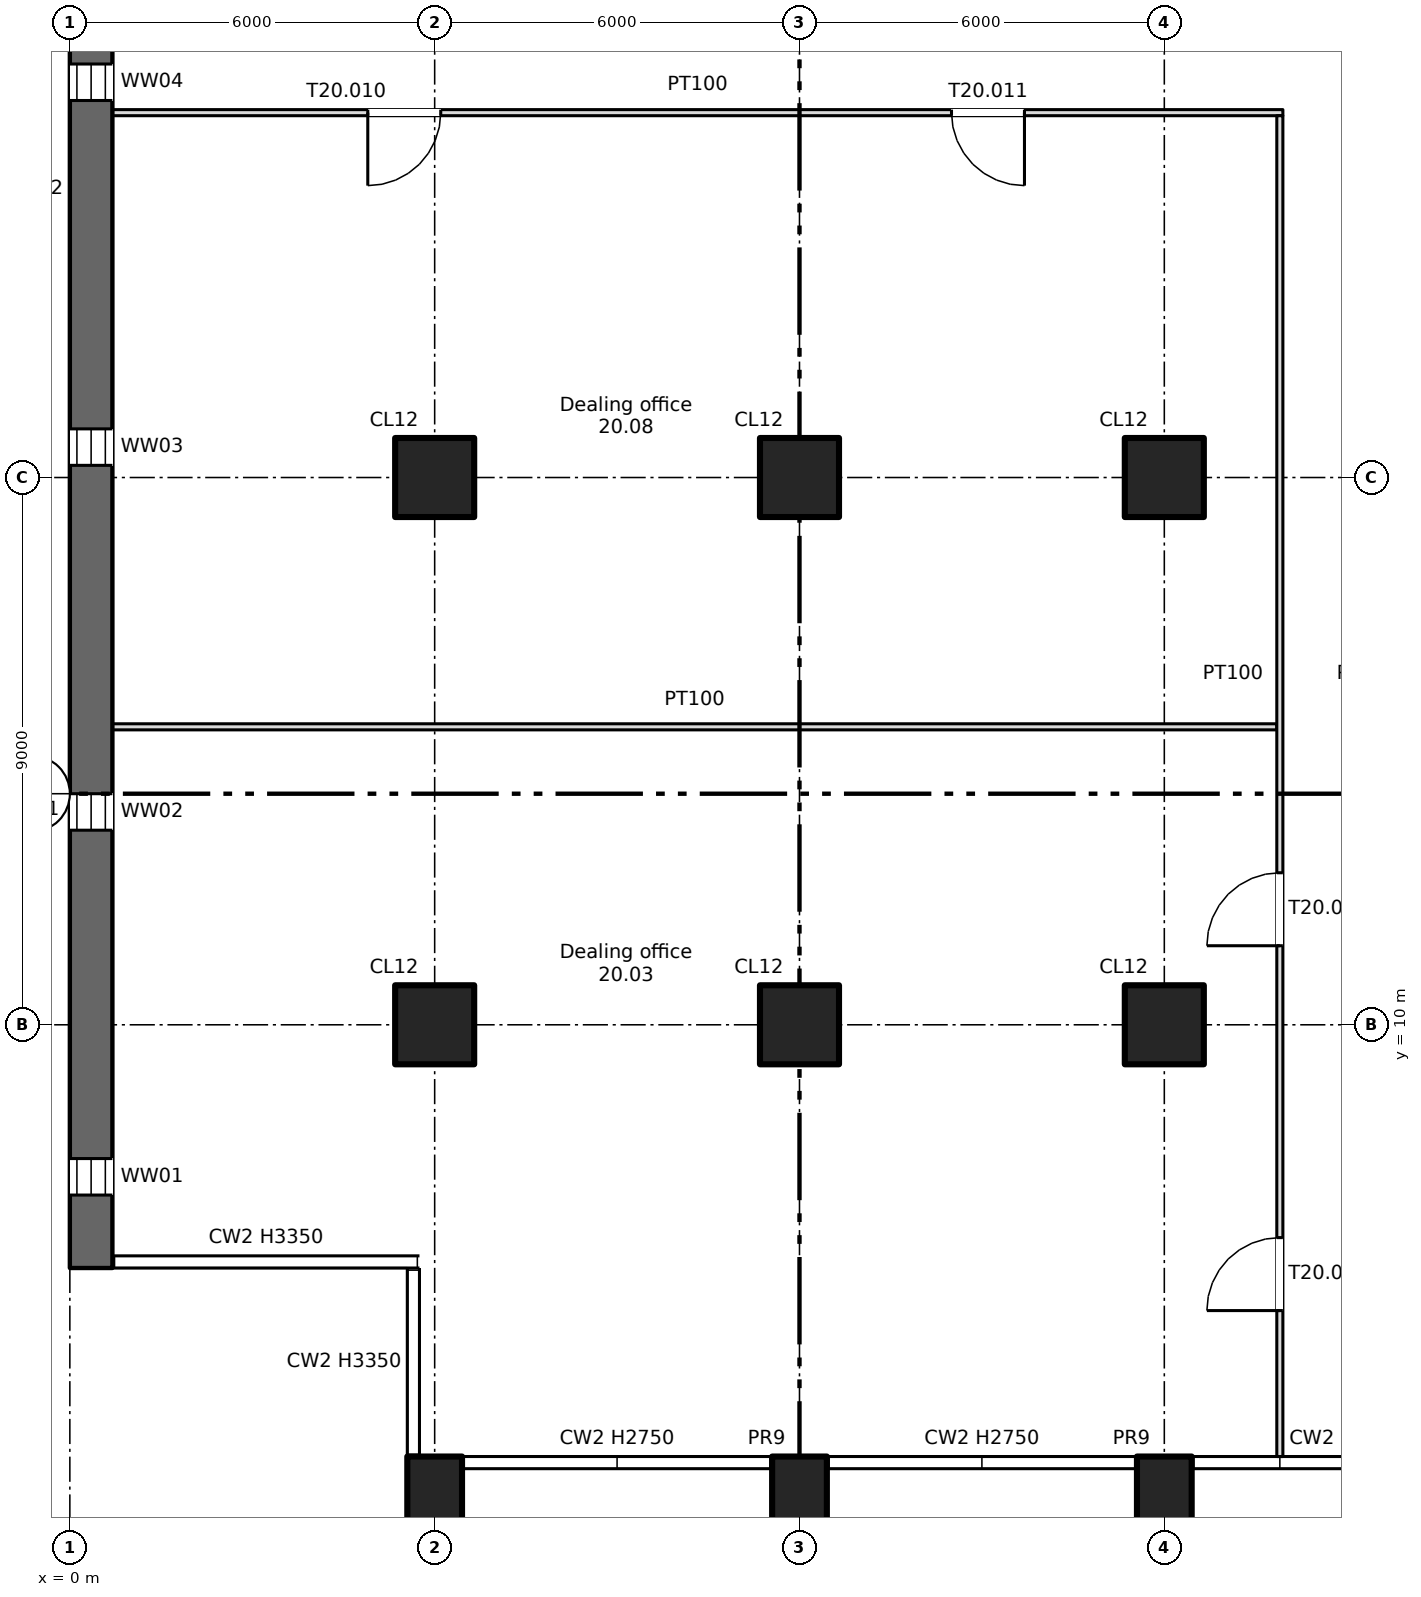
"""IFC4 building model, lengths in metres.
Left out: names, types, materials, properties, quantities, classifications, styles, units other than length and angle.
Written with IfcOpenShell. Run it as: python <this file> out.ifc"""

import sys

from ifc_helpers import new_model, si_unit, direction, frame, frame_2d, origin, origin_2d, place, context, subcontext, project, spatial, rectangle, extrude, element, fill, save


model = new_model("IFC4")
c1 = context("Model", 3, precision=1e-05, world=origin(), true_north=direction((0.0, 1.0)))
c2 = subcontext(c1, "Body", "Model", "MODEL_VIEW")
j1 = project(units=[si_unit("LENGTHUNIT", "METRE"), si_unit("PLANEANGLEUNIT", "RADIAN")], contexts=[c1])
p1 = place(None, origin())
s1 = spatial("IfcSite", under=j1, at=p1, CompositionType="ELEMENT")
p2 = place(p1, origin())
s2 = spatial("IfcBuilding", under=s1, at=p2, CompositionType="ELEMENT")
p3 = place(p2, frame((0.0, 0.0, 128.75)))
s3 = spatial("IfcBuildingStorey", under=s2, at=p3, CompositionType="ELEMENT", Elevation=128.75)
for number, where, z_axis, x_axis in (
    (1, (6.0, 2.2, -0.4), (0.0, 0.0, 1.0), (1.0, 0.0, 0.0)),
    (2, (12.0, 2.2, -0.4), (0.0, 0.0, 1.0), (1.0, 0.0, 0.0)),
    (3, (18.0, 2.2, -0.4), (0.0, 0.0, 1.0), (1.0, 0.0, 0.0)),
):
    element("IfcColumn", number, at=place(p3, frame(where, z_axis=z_axis, x_axis=x_axis)), inside=s3, PredefinedType="COLUMN", context=c2, shape_type="SweptSolid", body=[
        extrude(rectangle(XDim=0.9, YDim=1.4, at=origin_2d()), origin(), (0.0, 0.0, 1.0), 3.75),
    ])
for number, where, z_axis, x_axis in (
    (4, (6.0, 10.0, 0.0), (0.0, 0.0, 1.0), (1.0, 0.0, 0.0)),
    (5, (6.0, 19.0, 0.0), (0.0, 0.0, 1.0), (1.0, 0.0, 0.0)),
    (6, (12.0, 10.0, 0.0), (0.0, 0.0, 1.0), (1.0, 0.0, 0.0)),
    (7, (12.0, 19.0, 0.0), (0.0, 0.0, 1.0), (1.0, 0.0, 0.0)),
    (8, (18.0, 10.0, 0.0), (0.0, 0.0, 1.0), (1.0, 0.0, 0.0)),
    (9, (18.0, 19.0, 0.0), (0.0, 0.0, 1.0), (1.0, 0.0, 0.0)),
):
    element("IfcColumn", number, at=place(p3, frame(where, z_axis=z_axis, x_axis=x_axis)), inside=s3, PredefinedType="COLUMN", context=c2, shape_type="SweptSolid", body=[
        extrude(rectangle(XDim=1.3, YDim=1.3, at=origin_2d()), origin(), (0.0, 0.0, 1.0), 3.35),
    ])
p4 = place(p3, frame((0.35, 6.0, 0.0), z_axis=(0.0, 0.0, 1.0), x_axis=(0.0, 1.0, 0.0)))
e10 = element("IfcWall", 10, at=p4, inside=s3, PredefinedType="SHEAR", context=c2, shape_type="SweptSolid", body=[
    extrude(rectangle(XDim=35.5, YDim=0.7, at=frame_2d((17.75, 0.0))), origin(), (0.0, 0.0, 1.0), 3.35),
])
p5 = place(p4, frame((1.2, 0.0, 0.6)))
e11 = element("IfcOpeningElement", 11, at=p5, cuts=e10, PredefinedType="OPENING", context=c2, shape_type="SweptSolid", body=[
    extrude(rectangle(XDim=0.6, YDim=2.4, at=frame_2d((0.3, 1.2))), frame((0.0, 0.36, 0.0), z_axis=(0.0, -1.0, 0.0), x_axis=(1.0, 0.0, 0.0)), (0.0, 0.0, 1.0), 0.72),
])
p6 = place(p4, frame((7.2, 0.0, 0.6)))
e12 = element("IfcOpeningElement", 12, at=p6, cuts=e10, PredefinedType="OPENING", context=c2, shape_type="SweptSolid", body=[
    extrude(rectangle(XDim=0.6, YDim=2.4, at=frame_2d((0.3, 1.2))), frame((0.0, 0.36, 0.0), z_axis=(0.0, -1.0, 0.0), x_axis=(1.0, 0.0, 0.0)), (0.0, 0.0, 1.0), 0.72),
])
p7 = place(p4, frame((13.2, 0.0, 0.6)))
e13 = element("IfcOpeningElement", 13, at=p7, cuts=e10, PredefinedType="OPENING", context=c2, shape_type="SweptSolid", body=[
    extrude(rectangle(XDim=0.6, YDim=2.4, at=frame_2d((0.3, 1.2))), frame((0.0, 0.36, 0.0), z_axis=(0.0, -1.0, 0.0), x_axis=(1.0, 0.0, 0.0)), (0.0, 0.0, 1.0), 0.72),
])
p8 = place(p4, frame((19.2, 0.0, 0.6)))
e14 = element("IfcOpeningElement", 14, at=p8, cuts=e10, PredefinedType="OPENING", context=c2, shape_type="SweptSolid", body=[
    extrude(rectangle(XDim=0.6, YDim=2.4, at=frame_2d((0.3, 1.2))), frame((0.0, 0.36, 0.0), z_axis=(0.0, -1.0, 0.0), x_axis=(1.0, 0.0, 0.0)), (0.0, 0.0, 1.0), 0.72),
])
p9 = place(p4, frame((25.2, 0.0, 0.6)))
e15 = element("IfcOpeningElement", 15, at=p9, cuts=e10, PredefinedType="OPENING", context=c2, shape_type="SweptSolid", body=[
    extrude(rectangle(XDim=0.6, YDim=2.4, at=frame_2d((0.3, 1.2))), frame((0.0, 0.36, 0.0), z_axis=(0.0, -1.0, 0.0), x_axis=(1.0, 0.0, 0.0)), (0.0, 0.0, 1.0), 0.72),
])
p10 = place(p4, frame((31.2, 0.0, 0.6)))
e16 = element("IfcOpeningElement", 16, at=p10, cuts=e10, PredefinedType="OPENING", context=c2, shape_type="SweptSolid", body=[
    extrude(rectangle(XDim=0.6, YDim=2.4, at=frame_2d((0.3, 1.2))), frame((0.0, 0.36, 0.0), z_axis=(0.0, -1.0, 0.0), x_axis=(1.0, 0.0, 0.0)), (0.0, 0.0, 1.0), 0.72),
])
p11 = place(p3, frame((0.7, 14.9, 0.0), z_axis=(0.0, 0.0, 1.0), x_axis=(1.0, 0.0, 0.0)))
e17 = element("IfcWall", 17, at=p11, inside=s3, PredefinedType="PARTITIONING", context=c2, shape_type="SweptSolid", body=[
    extrude(rectangle(XDim=19.15, YDim=0.1, at=frame_2d((9.575, 0.0))), origin(), (0.0, 0.0, 1.0), 3.35),
])
p12 = place(p3, frame((0.7, 25.0, 0.0), z_axis=(0.0, 0.0, 1.0), x_axis=(1.0, 0.0, 0.0)))
e18 = element("IfcWall", 18, at=p12, inside=s3, PredefinedType="PARTITIONING", context=c2, shape_type="SweptSolid", body=[
    extrude(rectangle(XDim=19.25, YDim=0.1, at=frame_2d((9.625, 0.0))), origin(), (0.0, 0.0, 1.0), 3.35),
])
p13 = place(p12, frame((4.2, 0.0, 0.0)))
e19 = element("IfcOpeningElement", 19, at=p13, cuts=e18, PredefinedType="OPENING", context=c2, shape_type="SweptSolid", body=[
    extrude(rectangle(XDim=1.2, YDim=2.1, at=frame_2d((0.6, 1.05))), frame((0.0, 0.06, 0.0), z_axis=(0.0, -1.0, 0.0), x_axis=(1.0, 0.0, 0.0)), (0.0, 0.0, 1.0), 0.12),
])
p14 = place(p12, frame((13.8, 0.0, 0.0)))
e20 = element("IfcOpeningElement", 20, at=p14, cuts=e18, PredefinedType="OPENING", context=c2, shape_type="SweptSolid", body=[
    extrude(rectangle(XDim=1.2, YDim=2.1, at=frame_2d((0.6, 1.05))), frame((0.0, 0.06, 0.0), z_axis=(0.0, -1.0, 0.0), x_axis=(1.0, 0.0, 0.0)), (0.0, 0.0, 1.0), 0.12),
])
p15 = place(p3, frame((19.9, 2.9, 0.0), z_axis=(0.0, 0.0, 1.0), x_axis=(0.0, 1.0, 0.0)))
e21 = element("IfcWall", 21, at=p15, inside=s3, PredefinedType="PARTITIONING", context=c2, shape_type="SweptSolid", body=[
    extrude(rectangle(XDim=22.05, YDim=0.1, at=frame_2d((11.025, 0.0))), origin(), (0.0, 0.0, 1.0), 3.35),
])
p16 = place(p15, frame((2.4, 0.0, 0.0)))
e22 = element("IfcOpeningElement", 22, at=p16, cuts=e21, PredefinedType="OPENING", context=c2, shape_type="SweptSolid", body=[
    extrude(rectangle(XDim=1.2, YDim=2.1, at=frame_2d((0.6, 1.05))), frame((0.0, 0.06, 0.0), z_axis=(0.0, -1.0, 0.0), x_axis=(1.0, 0.0, 0.0)), (0.0, 0.0, 1.0), 0.12),
])
p17 = place(p15, frame((8.4, 0.0, 0.0)))
e23 = element("IfcOpeningElement", 23, at=p17, cuts=e21, PredefinedType="OPENING", context=c2, shape_type="SweptSolid", body=[
    extrude(rectangle(XDim=1.2, YDim=2.1, at=frame_2d((0.6, 1.05))), frame((0.0, 0.06, 0.0), z_axis=(0.0, -1.0, 0.0), x_axis=(1.0, 0.0, 0.0)), (0.0, 0.0, 1.0), 0.12),
])
p18 = place(p5, origin())
e24 = element("IfcWindow", 24, at=p18, inside=s3, PartitioningType="SINGLE_PANEL", PredefinedType="WINDOW", context=c2, shape_type="SweptSolid", body=[
    extrude(rectangle(XDim=0.6, YDim=2.4, at=frame_2d((0.3, 1.2))), frame((0.0, 0.03, 0.0), z_axis=(0.0, -1.0, 0.0), x_axis=(1.0, 0.0, 0.0)), (0.0, 0.0, 1.0), 0.06),
])
fill(e11, e24)
p19 = place(p6, origin())
e25 = element("IfcWindow", 25, at=p19, inside=s3, PartitioningType="SINGLE_PANEL", PredefinedType="WINDOW", context=c2, shape_type="SweptSolid", body=[
    extrude(rectangle(XDim=0.6, YDim=2.4, at=frame_2d((0.3, 1.2))), frame((0.0, 0.03, 0.0), z_axis=(0.0, -1.0, 0.0), x_axis=(1.0, 0.0, 0.0)), (0.0, 0.0, 1.0), 0.06),
])
fill(e12, e25)
p20 = place(p7, origin())
e26 = element("IfcWindow", 26, at=p20, inside=s3, PartitioningType="SINGLE_PANEL", PredefinedType="WINDOW", context=c2, shape_type="SweptSolid", body=[
    extrude(rectangle(XDim=0.6, YDim=2.4, at=frame_2d((0.3, 1.2))), frame((0.0, 0.03, 0.0), z_axis=(0.0, -1.0, 0.0), x_axis=(1.0, 0.0, 0.0)), (0.0, 0.0, 1.0), 0.06),
])
fill(e13, e26)
p21 = place(p8, origin())
e27 = element("IfcWindow", 27, at=p21, inside=s3, PartitioningType="SINGLE_PANEL", PredefinedType="WINDOW", context=c2, shape_type="SweptSolid", body=[
    extrude(rectangle(XDim=0.6, YDim=2.4, at=frame_2d((0.3, 1.2))), frame((0.0, 0.03, 0.0), z_axis=(0.0, -1.0, 0.0), x_axis=(1.0, 0.0, 0.0)), (0.0, 0.0, 1.0), 0.06),
])
fill(e14, e27)
p22 = place(p16, origin())
e28 = element("IfcDoor", 28, at=p22, inside=s3, OperationType="SINGLE_SWING_LEFT", PredefinedType="DOOR", context=c2, shape_type="SweptSolid", body=[
    extrude(rectangle(XDim=1.2, YDim=2.1, at=frame_2d((0.6, 1.05))), frame((0.0, 0.025, 0.0), z_axis=(0.0, -1.0, 0.0), x_axis=(1.0, 0.0, 0.0)), (0.0, 0.0, 1.0), 0.05),
])
fill(e22, e28)
p23 = place(p17, origin())
e29 = element("IfcDoor", 29, at=p23, inside=s3, OperationType="SINGLE_SWING_LEFT", PredefinedType="DOOR", context=c2, shape_type="SweptSolid", body=[
    extrude(rectangle(XDim=1.2, YDim=2.1, at=frame_2d((0.6, 1.05))), frame((0.0, 0.025, 0.0), z_axis=(0.0, -1.0, 0.0), x_axis=(1.0, 0.0, 0.0)), (0.0, 0.0, 1.0), 0.05),
])
fill(e23, e29)
p24 = place(p13, origin())
e30 = element("IfcDoor", 30, at=p24, inside=s3, OperationType="SINGLE_SWING_LEFT", PredefinedType="DOOR", context=c2, shape_type="SweptSolid", body=[
    extrude(rectangle(XDim=1.2, YDim=2.1, at=frame_2d((0.6, 1.05))), frame((0.0, 0.025, 0.0), z_axis=(0.0, -1.0, 0.0), x_axis=(1.0, 0.0, 0.0)), (0.0, 0.0, 1.0), 0.05),
])
fill(e19, e30)
p25 = place(p14, origin())
e31 = element("IfcDoor", 31, at=p25, inside=s3, OperationType="SINGLE_SWING_RIGHT", PredefinedType="DOOR", context=c2, shape_type="SweptSolid", body=[
    extrude(rectangle(XDim=1.2, YDim=2.1, at=frame_2d((0.6, 1.05))), frame((0.0, 0.025, 0.0), z_axis=(0.0, -1.0, 0.0), x_axis=(1.0, 0.0, 0.0)), (0.0, 0.0, 1.0), 0.05),
])
fill(e20, e31)
save(model, sys.argv[1])
